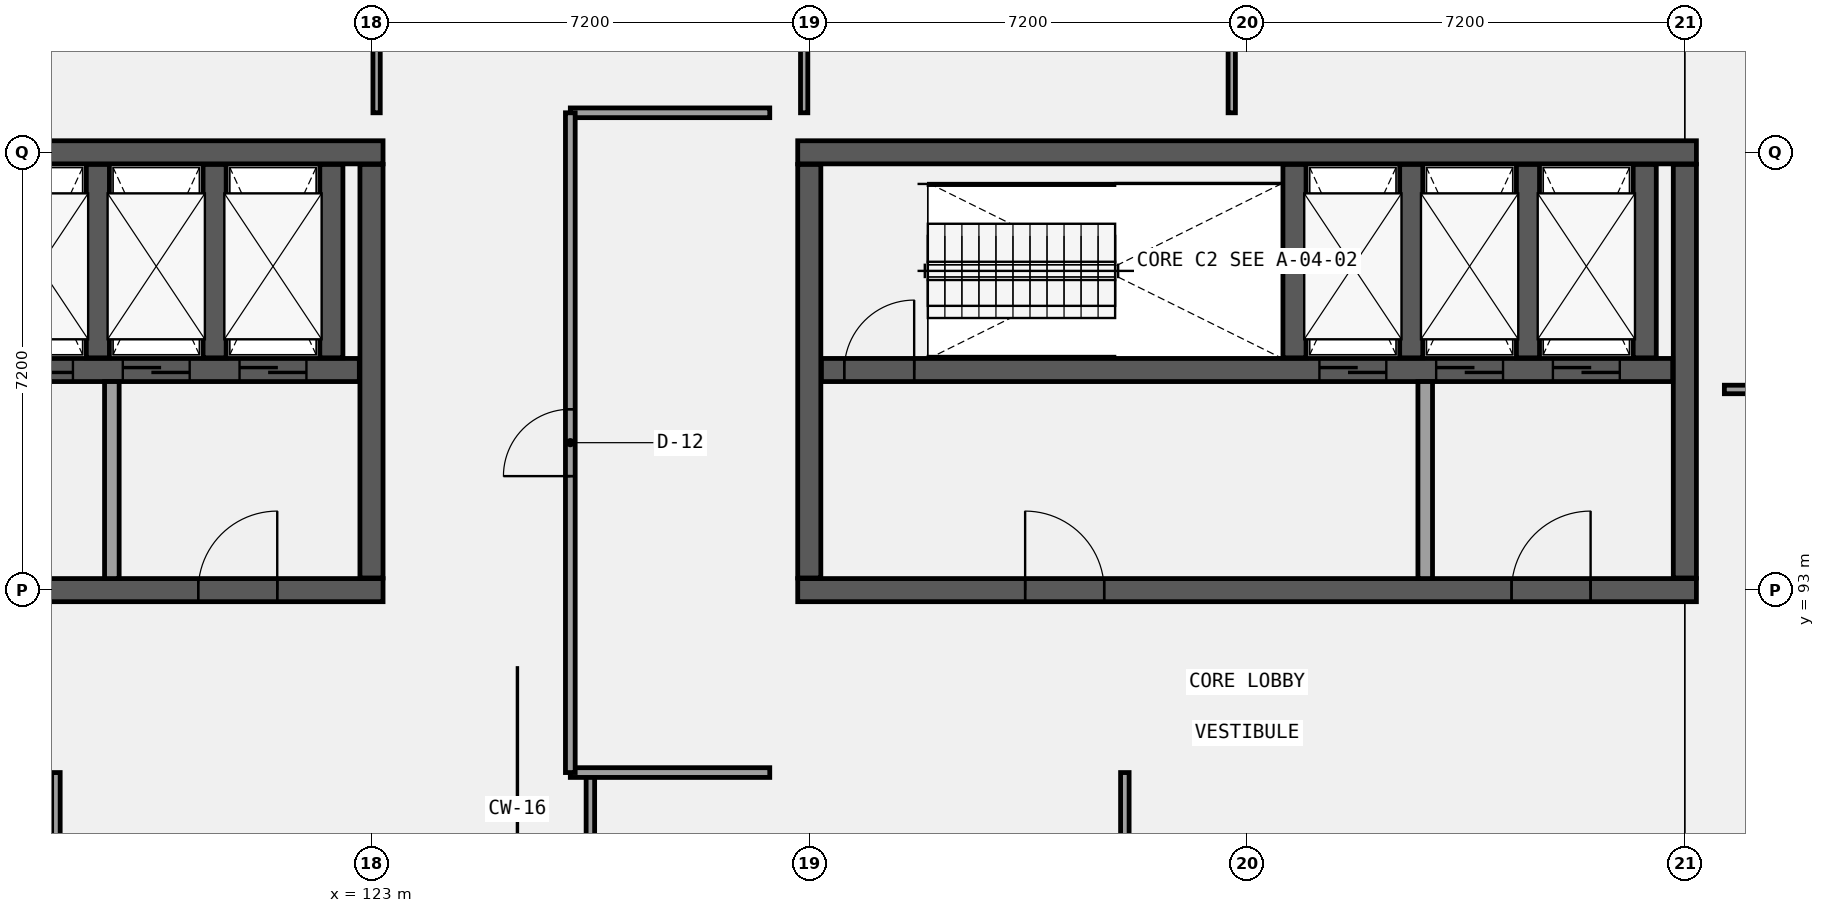
"""IFC4 building model, lengths in metres.
Left out: names, types, materials, properties, quantities, classifications, styles, units other than length and angle.
Written with IfcOpenShell. Run it as: python <this file> out.ifc"""

import sys

from ifc_helpers import new_model, si_unit, direction, frame, frame_2d, origin, place, context, subcontext, project, spatial, rectangle, extrude, element, fill, save


model = new_model("IFC4")
c1 = context("Model", 3, precision=1e-05, world=origin(), true_north=direction((0.0, 1.0)))
c2 = subcontext(c1, "Body", "Model", "MODEL_VIEW")
j1 = project(units=[si_unit("LENGTHUNIT", "METRE"), si_unit("PLANEANGLEUNIT", "RADIAN")], contexts=[c1])
p1 = place(None, origin())
s1 = spatial("IfcSite", under=j1, at=p1, CompositionType="ELEMENT")
p2 = place(p1, origin())
s2 = spatial("IfcBuilding", under=s1, at=p2, CompositionType="ELEMENT")
p3 = place(p2, frame((0.0, 0.0, 18.0)))
s3 = spatial("IfcBuildingStorey", under=s2, at=p3, CompositionType="ELEMENT", Elevation=18.0)
p4 = place(p3, frame((108.41, 100.2, 0.0), z_axis=(0.0, 0.0, 1.0), x_axis=(1.0, 0.0, 0.0)))
e1 = element("IfcWall", 1, at=p4, inside=s3, PredefinedType="SHEAR", context=c2, shape_type="SweptSolid", body=[
    extrude(rectangle(XDim=14.78, YDim=0.38, at=frame_2d((7.39, 0.0))), origin(), (0.0, 0.0, 1.0), 4.2),
])
p5 = place(p3, frame((108.41, 93.0, 0.0), z_axis=(0.0, 0.0, 1.0), x_axis=(1.0, 0.0, 0.0)))
e2 = element("IfcWall", 2, at=p5, inside=s3, PredefinedType="SHEAR", context=c2, shape_type="SweptSolid", body=[
    extrude(rectangle(XDim=14.78, YDim=0.38, at=frame_2d((7.39, 0.0))), origin(), (0.0, 0.0, 1.0), 4.2),
])
p6 = place(p5, frame((3.74, 0.0, 0.0)))
e3 = element("IfcOpeningElement", 3, at=p6, cuts=e2, PredefinedType="OPENING", context=c2, shape_type="SweptSolid", body=[
    extrude(rectangle(XDim=1.3, YDim=2.2, at=frame_2d((0.65, 1.1))), frame((0.0, 0.2, 0.0), z_axis=(0.0, -1.0, 0.0), x_axis=(1.0, 0.0, 0.0)), (0.0, 0.0, 1.0), 0.4),
])
p7 = place(p5, frame((11.74, 0.0, 0.0)))
e4 = element("IfcOpeningElement", 4, at=p7, cuts=e2, PredefinedType="OPENING", context=c2, shape_type="SweptSolid", body=[
    extrude(rectangle(XDim=1.3, YDim=2.2, at=frame_2d((0.65, 1.1))), frame((0.0, 0.2, 0.0), z_axis=(0.0, -1.0, 0.0), x_axis=(1.0, 0.0, 0.0)), (0.0, 0.0, 1.0), 0.4),
])
p8 = place(p3, frame((123.0, 93.2, 0.0), z_axis=(0.0, 0.0, 1.0), x_axis=(0.0, 1.0, 0.0)))
e5 = element("IfcWall", 5, at=p8, inside=s3, PredefinedType="SHEAR", context=c2, shape_type="SweptSolid", body=[
    extrude(rectangle(XDim=6.8, YDim=0.38, at=frame_2d((3.4, 0.0))), origin(), (0.0, 0.0, 1.0), 4.2),
])
p9 = place(p3, frame((108.8, 96.62, 0.0), z_axis=(0.0, 0.0, 1.0), x_axis=(1.0, 0.0, 0.0)))
e6 = element("IfcWall", 6, at=p9, inside=s3, PredefinedType="SHEAR", context=c2, shape_type="SweptSolid", body=[
    extrude(rectangle(XDim=14.0, YDim=0.38, at=frame_2d((7.0, 0.0))), origin(), (0.0, 0.0, 1.0), 4.2),
])
p10 = place(p9, frame((8.19, 0.0, 0.0)))
e7 = element("IfcOpeningElement", 7, at=p10, cuts=e6, PredefinedType="OPENING", context=c2, shape_type="SweptSolid", body=[
    extrude(rectangle(XDim=1.1, YDim=2.15, at=frame_2d((0.55, 1.075))), frame((0.0, 0.2, 0.0), z_axis=(0.0, -1.0, 0.0), x_axis=(1.0, 0.0, 0.0)), (0.0, 0.0, 1.0), 0.4),
])
p11 = place(p9, frame((10.11, 0.0, 0.0)))
e8 = element("IfcOpeningElement", 8, at=p11, cuts=e6, PredefinedType="OPENING", context=c2, shape_type="SweptSolid", body=[
    extrude(rectangle(XDim=1.1, YDim=2.15, at=frame_2d((0.55, 1.075))), frame((0.0, 0.2, 0.0), z_axis=(0.0, -1.0, 0.0), x_axis=(1.0, 0.0, 0.0)), (0.0, 0.0, 1.0), 0.4),
])
p12 = place(p9, frame((12.03, 0.0, 0.0)))
e9 = element("IfcOpeningElement", 9, at=p12, cuts=e6, PredefinedType="OPENING", context=c2, shape_type="SweptSolid", body=[
    extrude(rectangle(XDim=1.1, YDim=2.15, at=frame_2d((0.55, 1.075))), frame((0.0, 0.2, 0.0), z_axis=(0.0, -1.0, 0.0), x_axis=(1.0, 0.0, 0.0)), (0.0, 0.0, 1.0), 0.4),
])
p13 = place(p9, frame((0.375, 0.0, 0.0)))
e10 = element("IfcOpeningElement", 10, at=p13, cuts=e6, PredefinedType="OPENING", context=c2, shape_type="SweptSolid", body=[
    extrude(rectangle(XDim=1.15, YDim=2.15, at=frame_2d((0.575, 1.075))), frame((0.0, 0.2, 0.0), z_axis=(0.0, -1.0, 0.0), x_axis=(1.0, 0.0, 0.0)), (0.0, 0.0, 1.0), 0.4),
])
for number, where, z_axis, x_axis in (
    (11, (118.5, 96.82, 0.0), (0.0, 0.0, 1.0), (0.0, 1.0, 0.0)),
    (12, (120.42, 96.82, 0.0), (0.0, 0.0, 1.0), (0.0, 1.0, 0.0)),
    (13, (122.34, 96.82, 0.0), (0.0, 0.0, 1.0), (0.0, 1.0, 0.0)),
):
    element("IfcWall", number, at=place(p3, frame(where, z_axis=z_axis, x_axis=x_axis)), inside=s3, PredefinedType="SHEAR", context=c2, shape_type="SweptSolid", body=[
        extrude(rectangle(XDim=3.18, YDim=0.38, at=frame_2d((1.59, 0.0))), origin(), (0.0, 0.0, 1.0), 4.2),
    ])
p14 = place(p3, frame((130.01, 100.2, 0.0), z_axis=(0.0, 0.0, 1.0), x_axis=(1.0, 0.0, 0.0)))
e14 = element("IfcWall", 14, at=p14, inside=s3, PredefinedType="SHEAR", context=c2, shape_type="SweptSolid", body=[
    extrude(rectangle(XDim=14.78, YDim=0.38, at=frame_2d((7.39, 0.0))), origin(), (0.0, 0.0, 1.0), 4.2),
])
p15 = place(p3, frame((130.01, 93.0, 0.0), z_axis=(0.0, 0.0, 1.0), x_axis=(1.0, 0.0, 0.0)))
e15 = element("IfcWall", 15, at=p15, inside=s3, PredefinedType="SHEAR", context=c2, shape_type="SweptSolid", body=[
    extrude(rectangle(XDim=14.78, YDim=0.38, at=frame_2d((7.39, 0.0))), origin(), (0.0, 0.0, 1.0), 4.2),
])
p16 = place(p15, frame((3.74, 0.0, 0.0)))
e16 = element("IfcOpeningElement", 16, at=p16, cuts=e15, PredefinedType="OPENING", context=c2, shape_type="SweptSolid", body=[
    extrude(rectangle(XDim=1.3, YDim=2.2, at=frame_2d((0.65, 1.1))), frame((0.0, 0.2, 0.0), z_axis=(0.0, -1.0, 0.0), x_axis=(1.0, 0.0, 0.0)), (0.0, 0.0, 1.0), 0.4),
])
p17 = place(p15, frame((11.74, 0.0, 0.0)))
e17 = element("IfcOpeningElement", 17, at=p17, cuts=e15, PredefinedType="OPENING", context=c2, shape_type="SweptSolid", body=[
    extrude(rectangle(XDim=1.3, YDim=2.2, at=frame_2d((0.65, 1.1))), frame((0.0, 0.2, 0.0), z_axis=(0.0, -1.0, 0.0), x_axis=(1.0, 0.0, 0.0)), (0.0, 0.0, 1.0), 0.4),
])
for number, where, z_axis, x_axis in (
    (18, (130.2, 93.2, 0.0), (0.0, 0.0, 1.0), (0.0, 1.0, 0.0)),
    (19, (144.6, 93.2, 0.0), (0.0, 0.0, 1.0), (0.0, 1.0, 0.0)),
):
    element("IfcWall", number, at=place(p3, frame(where, z_axis=z_axis, x_axis=x_axis)), inside=s3, PredefinedType="SHEAR", context=c2, shape_type="SweptSolid", body=[
        extrude(rectangle(XDim=6.8, YDim=0.38, at=frame_2d((3.4, 0.0))), origin(), (0.0, 0.0, 1.0), 4.2),
    ])
p18 = place(p3, frame((130.4, 96.62, 0.0), z_axis=(0.0, 0.0, 1.0), x_axis=(1.0, 0.0, 0.0)))
e20 = element("IfcWall", 20, at=p18, inside=s3, PredefinedType="SHEAR", context=c2, shape_type="SweptSolid", body=[
    extrude(rectangle(XDim=14.0, YDim=0.38, at=frame_2d((7.0, 0.0))), origin(), (0.0, 0.0, 1.0), 4.2),
])
p19 = place(p18, frame((8.19, 0.0, 0.0)))
e21 = element("IfcOpeningElement", 21, at=p19, cuts=e20, PredefinedType="OPENING", context=c2, shape_type="SweptSolid", body=[
    extrude(rectangle(XDim=1.1, YDim=2.15, at=frame_2d((0.55, 1.075))), frame((0.0, 0.2, 0.0), z_axis=(0.0, -1.0, 0.0), x_axis=(1.0, 0.0, 0.0)), (0.0, 0.0, 1.0), 0.4),
])
p20 = place(p18, frame((10.11, 0.0, 0.0)))
e22 = element("IfcOpeningElement", 22, at=p20, cuts=e20, PredefinedType="OPENING", context=c2, shape_type="SweptSolid", body=[
    extrude(rectangle(XDim=1.1, YDim=2.15, at=frame_2d((0.55, 1.075))), frame((0.0, 0.2, 0.0), z_axis=(0.0, -1.0, 0.0), x_axis=(1.0, 0.0, 0.0)), (0.0, 0.0, 1.0), 0.4),
])
p21 = place(p18, frame((12.03, 0.0, 0.0)))
e23 = element("IfcOpeningElement", 23, at=p21, cuts=e20, PredefinedType="OPENING", context=c2, shape_type="SweptSolid", body=[
    extrude(rectangle(XDim=1.1, YDim=2.15, at=frame_2d((0.55, 1.075))), frame((0.0, 0.2, 0.0), z_axis=(0.0, -1.0, 0.0), x_axis=(1.0, 0.0, 0.0)), (0.0, 0.0, 1.0), 0.4),
])
p22 = place(p18, frame((0.375, 0.0, 0.0)))
e24 = element("IfcOpeningElement", 24, at=p22, cuts=e20, PredefinedType="OPENING", context=c2, shape_type="SweptSolid", body=[
    extrude(rectangle(XDim=1.15, YDim=2.15, at=frame_2d((0.575, 1.075))), frame((0.0, 0.2, 0.0), z_axis=(0.0, -1.0, 0.0), x_axis=(1.0, 0.0, 0.0)), (0.0, 0.0, 1.0), 0.4),
])
for number, where, z_axis, x_axis in (
    (25, (138.18, 96.82, 0.0), (0.0, 0.0, 1.0), (0.0, 1.0, 0.0)),
    (26, (140.1, 96.82, 0.0), (0.0, 0.0, 1.0), (0.0, 1.0, 0.0)),
    (27, (142.02, 96.82, 0.0), (0.0, 0.0, 1.0), (0.0, 1.0, 0.0)),
    (28, (143.94, 96.82, 0.0), (0.0, 0.0, 1.0), (0.0, 1.0, 0.0)),
):
    element("IfcWall", number, at=place(p3, frame(where, z_axis=z_axis, x_axis=x_axis)), inside=s3, PredefinedType="SHEAR", context=c2, shape_type="SweptSolid", body=[
        extrude(rectangle(XDim=3.18, YDim=0.38, at=frame_2d((1.59, 0.0))), origin(), (0.0, 0.0, 1.0), 4.2),
    ])
for number, where, z_axis, x_axis in (
    (29, (118.73, 93.19, 0.0), (0.0, 0.0, 1.0), (0.0, 1.0, 0.0)),
    (30, (140.33, 93.19, 0.0), (0.0, 0.0, 1.0), (0.0, 1.0, 0.0)),
):
    element("IfcWall", number, at=place(p3, frame(where, z_axis=z_axis, x_axis=x_axis)), inside=s3, PredefinedType="SOLIDWALL", context=c2, shape_type="SweptSolid", body=[
        extrude(rectangle(XDim=3.24, YDim=0.24, at=frame_2d((1.62, 0.0))), origin(), (0.0, 0.0, 1.0), 3.91),
    ])
p23 = place(p3, frame((123.084, 100.85, 0.0), z_axis=(0.0, 0.0, 1.0), x_axis=(0.0, 1.0, 0.0)))
e31 = element("IfcWall", 31, at=p23, inside=s3, PredefinedType="PARTITIONING", context=c2, shape_type="SweptSolid", body=[
    extrude(rectangle(XDim=7.29, YDim=0.12, at=frame_2d((3.645, 0.0))), origin(), (0.0, 0.0, 1.0), 3.14),
])
p24 = place(p3, frame((130.116, 100.85, 0.0), z_axis=(0.0, 0.0, 1.0), x_axis=(0.0, 1.0, 0.0)))
e32 = element("IfcWall", 32, at=p24, inside=s3, PredefinedType="PARTITIONING", context=c2, shape_type="SweptSolid", body=[
    extrude(rectangle(XDim=7.29, YDim=0.12, at=frame_2d((3.645, 0.0))), origin(), (0.0, 0.0, 1.0), 3.09),
])
p25 = place(p3, frame((137.148, 100.85, 0.0), z_axis=(0.0, 0.0, 1.0), x_axis=(0.0, 1.0, 0.0)))
e33 = element("IfcWall", 33, at=p25, inside=s3, PredefinedType="PARTITIONING", context=c2, shape_type="SweptSolid", body=[
    extrude(rectangle(XDim=7.29, YDim=0.12, at=frame_2d((3.645, 0.0))), origin(), (0.0, 0.0, 1.0), 3.04),
])
for number, where, z_axis, x_axis in (
    (34, (117.81, 81.64, 0.0), (0.0, 0.0, 1.0), (0.0, 1.0, 0.0)),
    (35, (126.6, 81.64, 0.0), (0.0, 0.0, 1.0), (0.0, 1.0, 0.0)),
    (36, (135.39, 81.64, 0.0), (0.0, 0.0, 1.0), (0.0, 1.0, 0.0)),
):
    element("IfcWall", number, at=place(p3, frame(where, z_axis=z_axis, x_axis=x_axis)), inside=s3, PredefinedType="PARTITIONING", context=c2, shape_type="SweptSolid", body=[
        extrude(rectangle(XDim=8.36, YDim=0.14, at=frame_2d((4.18, 0.0))), origin(), (0.0, 0.0, 1.0), 3.94),
    ])
for number, where, z_axis, x_axis in (
    (37, (126.27, 90.0, 0.0), (0.0, 0.0, 1.0), (1.0, 0.0, 0.0)),
    (38, (126.27, 100.85, 0.0), (0.0, 0.0, 1.0), (1.0, 0.0, 0.0)),
):
    element("IfcWall", number, at=place(p3, frame(where, z_axis=z_axis, x_axis=x_axis)), inside=s3, PredefinedType="PARTITIONING", context=c2, shape_type="SweptSolid", body=[
        extrude(rectangle(XDim=3.28, YDim=0.16, at=frame_2d((1.64, 0.0))), origin(), (0.0, 0.0, 1.0), 3.94),
    ])
p26 = place(p3, frame((126.27, 90.0, 0.0), z_axis=(0.0, 0.0, 1.0), x_axis=(0.0, 1.0, 0.0)))
e39 = element("IfcWall", 39, at=p26, inside=s3, PredefinedType="PARTITIONING", context=c2, shape_type="SweptSolid", body=[
    extrude(rectangle(XDim=10.85, YDim=0.16, at=frame_2d((5.425, 0.0))), origin(), (0.0, 0.0, 1.0), 3.94),
])
p27 = place(p26, frame((4.875, 0.0, 0.0)))
e40 = element("IfcOpeningElement", 40, at=p27, cuts=e39, PredefinedType="OPENING", context=c2, shape_type="SweptSolid", body=[
    extrude(rectangle(XDim=1.1, YDim=2.35, at=frame_2d((0.55, 1.175))), frame((0.0, 0.09, 0.0), z_axis=(0.0, -1.0, 0.0), x_axis=(1.0, 0.0, 0.0)), (0.0, 0.0, 1.0), 0.18),
])
p28 = place(p3, frame((145.25, 96.3, 0.0), z_axis=(0.0, 0.0, 1.0), x_axis=(1.0, 0.0, 0.0)))
e41 = element("IfcWall", 41, at=p28, inside=s3, PredefinedType="PARTITIONING", context=c2, shape_type="SweptSolid", body=[
    extrude(rectangle(XDim=9.945, YDim=0.14, at=frame_2d((4.973, 0.0))), origin(), (0.0, 0.0, 1.0), 3.94),
])
p29 = place(p10, frame((1.1, 0.0, 0.0), z_axis=(0.0, 0.0, 1.0), x_axis=(-1.0, 0.0, 0.0)))
e42 = element("IfcDoor", 42, at=p29, inside=s3, OperationType="DOUBLE_DOOR_SLIDING", PredefinedType="DOOR", context=c2, shape_type="SweptSolid", body=[
    extrude(rectangle(XDim=1.1, YDim=2.15, at=frame_2d((0.55, 1.075))), frame((0.0, 0.025, 0.0), z_axis=(0.0, -1.0, 0.0), x_axis=(1.0, 0.0, 0.0)), (0.0, 0.0, 1.0), 0.05),
])
fill(e7, e42)
p30 = place(p11, frame((1.1, 0.0, 0.0), z_axis=(0.0, 0.0, 1.0), x_axis=(-1.0, 0.0, 0.0)))
e43 = element("IfcDoor", 43, at=p30, inside=s3, OperationType="DOUBLE_DOOR_SLIDING", PredefinedType="DOOR", context=c2, shape_type="SweptSolid", body=[
    extrude(rectangle(XDim=1.1, YDim=2.15, at=frame_2d((0.55, 1.075))), frame((0.0, 0.025, 0.0), z_axis=(0.0, -1.0, 0.0), x_axis=(1.0, 0.0, 0.0)), (0.0, 0.0, 1.0), 0.05),
])
fill(e8, e43)
p31 = place(p12, frame((1.1, 0.0, 0.0), z_axis=(0.0, 0.0, 1.0), x_axis=(-1.0, 0.0, 0.0)))
e44 = element("IfcDoor", 44, at=p31, inside=s3, OperationType="DOUBLE_DOOR_SLIDING", PredefinedType="DOOR", context=c2, shape_type="SweptSolid", body=[
    extrude(rectangle(XDim=1.1, YDim=2.15, at=frame_2d((0.55, 1.075))), frame((0.0, 0.025, 0.0), z_axis=(0.0, -1.0, 0.0), x_axis=(1.0, 0.0, 0.0)), (0.0, 0.0, 1.0), 0.05),
])
fill(e9, e44)
p32 = place(p7, frame((1.3, 0.0, 0.0), z_axis=(0.0, 0.0, 1.0), x_axis=(-1.0, 0.0, 0.0)))
e45 = element("IfcDoor", 45, at=p32, inside=s3, OperationType="SINGLE_SWING_RIGHT", PredefinedType="DOOR", context=c2, shape_type="SweptSolid", body=[
    extrude(rectangle(XDim=1.3, YDim=2.2, at=frame_2d((0.65, 1.1))), frame((0.0, 0.025, 0.0), z_axis=(0.0, -1.0, 0.0), x_axis=(1.0, 0.0, 0.0)), (0.0, 0.0, 1.0), 0.05),
])
fill(e4, e45)
p33 = place(p19, frame((1.1, 0.0, 0.0), z_axis=(0.0, 0.0, 1.0), x_axis=(-1.0, 0.0, 0.0)))
e46 = element("IfcDoor", 46, at=p33, inside=s3, OperationType="DOUBLE_DOOR_SLIDING", PredefinedType="DOOR", context=c2, shape_type="SweptSolid", body=[
    extrude(rectangle(XDim=1.1, YDim=2.15, at=frame_2d((0.55, 1.075))), frame((0.0, 0.025, 0.0), z_axis=(0.0, -1.0, 0.0), x_axis=(1.0, 0.0, 0.0)), (0.0, 0.0, 1.0), 0.05),
])
fill(e21, e46)
p34 = place(p20, frame((1.1, 0.0, 0.0), z_axis=(0.0, 0.0, 1.0), x_axis=(-1.0, 0.0, 0.0)))
e47 = element("IfcDoor", 47, at=p34, inside=s3, OperationType="DOUBLE_DOOR_SLIDING", PredefinedType="DOOR", context=c2, shape_type="SweptSolid", body=[
    extrude(rectangle(XDim=1.1, YDim=2.15, at=frame_2d((0.55, 1.075))), frame((0.0, 0.025, 0.0), z_axis=(0.0, -1.0, 0.0), x_axis=(1.0, 0.0, 0.0)), (0.0, 0.0, 1.0), 0.05),
])
fill(e22, e47)
p35 = place(p21, frame((1.1, 0.0, 0.0), z_axis=(0.0, 0.0, 1.0), x_axis=(-1.0, 0.0, 0.0)))
e48 = element("IfcDoor", 48, at=p35, inside=s3, OperationType="DOUBLE_DOOR_SLIDING", PredefinedType="DOOR", context=c2, shape_type="SweptSolid", body=[
    extrude(rectangle(XDim=1.1, YDim=2.15, at=frame_2d((0.55, 1.075))), frame((0.0, 0.025, 0.0), z_axis=(0.0, -1.0, 0.0), x_axis=(1.0, 0.0, 0.0)), (0.0, 0.0, 1.0), 0.05),
])
fill(e23, e48)
p36 = place(p22, origin())
e49 = element("IfcDoor", 49, at=p36, inside=s3, OperationType="SINGLE_SWING_RIGHT", PredefinedType="DOOR", context=c2, shape_type="SweptSolid", body=[
    extrude(rectangle(XDim=1.15, YDim=2.15, at=frame_2d((0.575, 1.075))), frame((0.0, 0.025, 0.0), z_axis=(0.0, -1.0, 0.0), x_axis=(1.0, 0.0, 0.0)), (0.0, 0.0, 1.0), 0.05),
])
fill(e24, e49)
p37 = place(p16, frame((1.3, 0.0, 0.0), z_axis=(0.0, 0.0, 1.0), x_axis=(-1.0, 0.0, 0.0)))
e50 = element("IfcDoor", 50, at=p37, inside=s3, OperationType="SINGLE_SWING_LEFT", PredefinedType="DOOR", context=c2, shape_type="SweptSolid", body=[
    extrude(rectangle(XDim=1.3, YDim=2.2, at=frame_2d((0.65, 1.1))), frame((0.0, 0.025, 0.0), z_axis=(0.0, -1.0, 0.0), x_axis=(1.0, 0.0, 0.0)), (0.0, 0.0, 1.0), 0.05),
])
fill(e16, e50)
p38 = place(p17, frame((1.3, 0.0, 0.0), z_axis=(0.0, 0.0, 1.0), x_axis=(-1.0, 0.0, 0.0)))
e51 = element("IfcDoor", 51, at=p38, inside=s3, OperationType="SINGLE_SWING_RIGHT", PredefinedType="DOOR", context=c2, shape_type="SweptSolid", body=[
    extrude(rectangle(XDim=1.3, YDim=2.2, at=frame_2d((0.65, 1.1))), frame((0.0, 0.025, 0.0), z_axis=(0.0, -1.0, 0.0), x_axis=(1.0, 0.0, 0.0)), (0.0, 0.0, 1.0), 0.05),
])
fill(e17, e51)
p39 = place(p27, origin())
e52 = element("IfcDoor", 52, at=p39, inside=s3, OperationType="SINGLE_SWING_LEFT", PredefinedType="DOOR", context=c2, shape_type="SweptSolid", body=[
    extrude(rectangle(XDim=1.1, YDim=2.35, at=frame_2d((0.55, 1.175))), frame((0.0, 0.025, 0.0), z_axis=(0.0, -1.0, 0.0), x_axis=(1.0, 0.0, 0.0)), (0.0, 0.0, 1.0), 0.05),
])
fill(e40, e52)
save(model, sys.argv[1])
